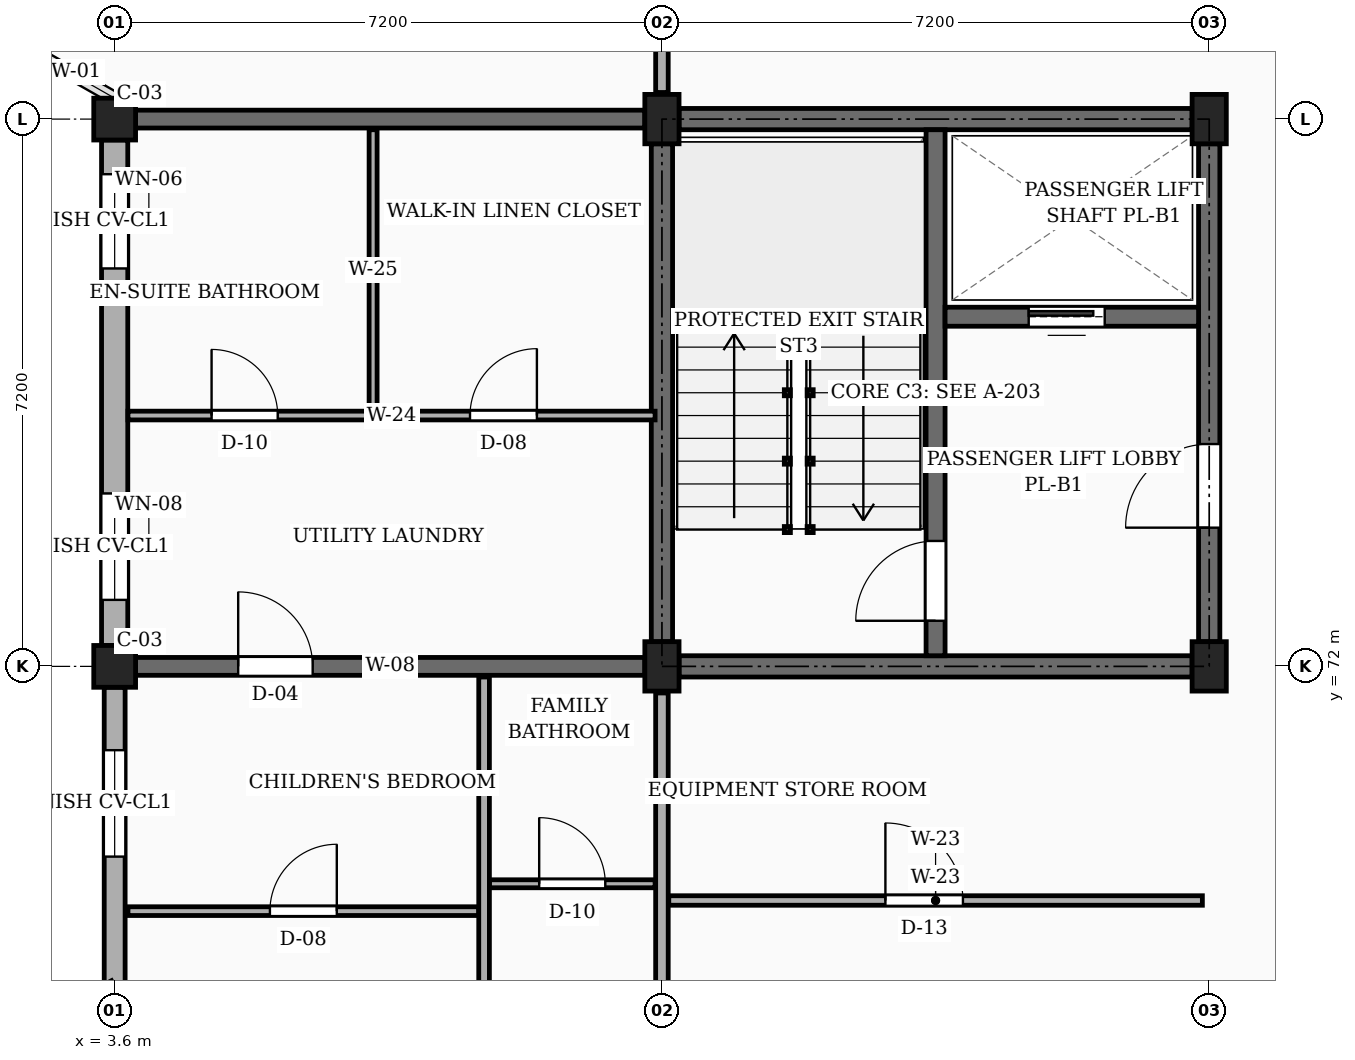
"""IFC4 building model, lengths in metres.
Left out: names, types, materials, properties, quantities, classifications, styles, units other than length and angle.
Written with IfcOpenShell. Run it as: python <this file> out.ifc"""

import sys

from ifc_helpers import new_model, si_unit, direction, frame, frame_2d, origin, origin_2d, place, context, subcontext, project, spatial, rectangle, extrude, element, fill, save


model = new_model("IFC4")
c1 = context("Model", 3, precision=1e-05, world=origin(), true_north=direction((0.0, 1.0)))
c2 = subcontext(c1, "Body", "Model", "MODEL_VIEW")
j1 = project(units=[si_unit("LENGTHUNIT", "METRE"), si_unit("PLANEANGLEUNIT", "RADIAN")], contexts=[c1])
p1 = place(None, origin())
s1 = spatial("IfcSite", under=j1, at=p1, CompositionType="ELEMENT")
p2 = place(p1, origin())
s2 = spatial("IfcBuilding", under=s1, at=p2, CompositionType="ELEMENT")
p3 = place(p2, frame((0.0, 0.0, 13.95)))
s3 = spatial("IfcBuildingStorey", under=s2, at=p3, CompositionType="ELEMENT", Elevation=13.95)
for number, where, z_axis, x_axis in (
    (1, (3.6, 72.0, 0.0), (0.0, 0.0, 1.0), (1.0, 0.0, 0.0)),
    (2, (3.6, 79.2, 0.0), (0.0, 0.0, 1.0), (1.0, 0.0, 0.0)),
):
    element("IfcColumn", number, at=place(p3, frame(where, z_axis=z_axis, x_axis=x_axis)), inside=s3, PredefinedType="COLUMN", context=c2, shape_type="SweptSolid", body=[
        extrude(rectangle(XDim=0.55, YDim=0.55, at=origin_2d()), origin(), (0.0, 0.0, 1.0), 3.15),
    ])
for number, where, z_axis, x_axis in (
    (3, (10.8, 72.0, 0.0), (0.0, 0.0, 1.0), (1.0, 0.0, 0.0)),
    (4, (10.8, 79.2, 0.0), (0.0, 0.0, 1.0), (1.0, 0.0, 0.0)),
    (5, (18.0, 72.0, 0.0), (0.0, 0.0, 1.0), (1.0, 0.0, 0.0)),
    (6, (18.0, 79.2, 0.0), (0.0, 0.0, 1.0), (1.0, 0.0, 0.0)),
):
    element("IfcColumn", number, at=place(p3, frame(where, z_axis=z_axis, x_axis=x_axis)), inside=s3, PredefinedType="COLUMN", context=c2, shape_type="SweptSolid", body=[
        extrude(rectangle(XDim=0.45, YDim=0.65, at=origin_2d()), origin(), (0.0, 0.0, 1.0), 3.15),
    ])
p4 = place(p3, frame((3.875, 72.0, 0.0), z_axis=(0.0, 0.0, 1.0), x_axis=(1.0, 0.0, 0.0)))
e7 = element("IfcWall", 7, at=p4, inside=s3, PredefinedType="SOLIDWALL", context=c2, shape_type="SweptSolid", body=[
    extrude(rectangle(XDim=6.7, YDim=0.235, at=frame_2d((3.35, 0.0))), origin(), (0.0, 0.0, 1.0), 2.21),
])
p5 = place(p4, frame((1.35, 0.0, 0.0)))
e8 = element("IfcOpeningElement", 8, at=p5, cuts=e7, PredefinedType="OPENING", context=c2, shape_type="SweptSolid", body=[
    extrude(rectangle(XDim=0.98, YDim=2.12, at=frame_2d((0.49, 1.06))), frame((0.0, 0.127, 0.0), z_axis=(0.0, -1.0, 0.0), x_axis=(1.0, 0.0, 0.0)), (0.0, 0.0, 1.0), 0.255),
])
p6 = place(p3, frame((3.875, 79.2, 0.0), z_axis=(0.0, 0.0, 1.0), x_axis=(1.0, 0.0, 0.0)))
e9 = element("IfcWall", 9, at=p6, inside=s3, PredefinedType="SOLIDWALL", context=c2, shape_type="SweptSolid", body=[
    extrude(rectangle(XDim=6.7, YDim=0.235, at=frame_2d((3.35, 0.0))), origin(), (0.0, 0.0, 1.0), 2.21),
])
p7 = place(p3, frame((3.6, 78.925, 0.0), z_axis=(0.0, 0.0, 1.0), x_axis=(0.0, -1.0, 0.0)))
e10 = element("IfcWall", 10, at=p7, inside=s3, PredefinedType="SOLIDWALL", context=c2, shape_type="SweptSolid", body=[
    extrude(rectangle(XDim=6.65, YDim=0.345, at=frame_2d((3.325, 0.0))), origin(), (0.0, 0.0, 1.0), 2.48),
])
p8 = place(p7, frame((0.45, 0.0, 0.78)))
e11 = element("IfcOpeningElement", 11, at=p8, cuts=e10, PredefinedType="OPENING", context=c2, shape_type="SweptSolid", body=[
    extrude(rectangle(XDim=1.24, YDim=1.15, at=frame_2d((0.62, 0.575))), frame((0.0, 0.183, 0.0), z_axis=(0.0, -1.0, 0.0), x_axis=(1.0, 0.0, 0.0)), (0.0, 0.0, 1.0), 0.365),
])
p9 = place(p7, frame((4.65, 0.0, 0.78)))
e12 = element("IfcOpeningElement", 12, at=p9, cuts=e10, PredefinedType="OPENING", context=c2, shape_type="SweptSolid", body=[
    extrude(rectangle(XDim=1.4, YDim=1.15, at=frame_2d((0.7, 0.575))), frame((0.0, 0.183, 0.0), z_axis=(0.0, -1.0, 0.0), x_axis=(1.0, 0.0, 0.0)), (0.0, 0.0, 1.0), 0.365),
])
p10 = place(p3, frame((3.6, 71.725, 0.0), z_axis=(0.0, 0.0, 1.0), x_axis=(0.0, -1.0, 0.0)))
e13 = element("IfcWall", 13, at=p10, inside=s3, PredefinedType="SOLIDWALL", context=c2, shape_type="SweptSolid", body=[
    extrude(rectangle(XDim=3.905, YDim=0.275, at=frame_2d((1.953, 0.0))), origin(), (0.0, 0.0, 1.0), 2.48),
])
p11 = place(p10, frame((0.827, 0.0, 0.78)))
e14 = element("IfcOpeningElement", 14, at=p11, cuts=e13, PredefinedType="OPENING", context=c2, shape_type="SweptSolid", body=[
    extrude(rectangle(XDim=1.4, YDim=1.15, at=frame_2d((0.7, 0.575))), frame((0.0, 0.147, 0.0), z_axis=(0.0, -1.0, 0.0), x_axis=(1.0, 0.0, 0.0)), (0.0, 0.0, 1.0), 0.295),
])
p12 = place(p3, frame((10.8, 72.325, 0.0), z_axis=(0.0, 0.0, 1.0), x_axis=(0.0, 1.0, 0.0)))
e15 = element("IfcWall", 15, at=p12, inside=s3, PredefinedType="SHEAR", context=c2, shape_type="SweptSolid", body=[
    extrude(rectangle(XDim=6.55, YDim=0.28, at=frame_2d((3.275, 0.0))), origin(), (0.0, 0.0, 1.0), 2.91),
])
p13 = place(p3, frame((11.025, 79.2, 0.0), z_axis=(0.0, 0.0, 1.0), x_axis=(1.0, 0.0, 0.0)))
e16 = element("IfcWall", 16, at=p13, inside=s3, PredefinedType="SHEAR", context=c2, shape_type="SweptSolid", body=[
    extrude(rectangle(XDim=6.75, YDim=0.28, at=frame_2d((3.375, 0.0))), origin(), (0.0, 0.0, 1.0), 2.91),
])
p14 = place(p3, frame((18.0, 72.325, 0.0), z_axis=(0.0, 0.0, 1.0), x_axis=(0.0, 1.0, 0.0)))
e17 = element("IfcWall", 17, at=p14, inside=s3, PredefinedType="SHEAR", context=c2, shape_type="SweptSolid", body=[
    extrude(rectangle(XDim=6.55, YDim=0.28, at=frame_2d((3.275, 0.0))), origin(), (0.0, 0.0, 1.0), 2.91),
])
p15 = place(p14, frame((1.5, 0.0, 0.0)))
e18 = element("IfcOpeningElement", 18, at=p15, cuts=e17, PredefinedType="OPENING", context=c2, shape_type="SweptSolid", body=[
    extrude(rectangle(XDim=1.1, YDim=2.15, at=frame_2d((0.55, 1.075))), frame((0.0, 0.15, 0.0), z_axis=(0.0, -1.0, 0.0), x_axis=(1.0, 0.0, 0.0)), (0.0, 0.0, 1.0), 0.3),
])
p16 = place(p3, frame((11.025, 72.0, 0.0), z_axis=(0.0, 0.0, 1.0), x_axis=(1.0, 0.0, 0.0)))
e19 = element("IfcWall", 19, at=p16, inside=s3, PredefinedType="SHEAR", context=c2, shape_type="SweptSolid", body=[
    extrude(rectangle(XDim=6.75, YDim=0.28, at=frame_2d((3.375, 0.0))), origin(), (0.0, 0.0, 1.0), 2.91),
])
p17 = place(p3, frame((14.4, 72.14, 0.0), z_axis=(0.0, 0.0, 1.0), x_axis=(0.0, 1.0, 0.0)))
e20 = element("IfcWall", 20, at=p17, inside=s3, PredefinedType="SHEAR", context=c2, shape_type="SweptSolid", body=[
    extrude(rectangle(XDim=6.92, YDim=0.25, at=frame_2d((3.46, 0.0))), origin(), (0.0, 0.0, 1.0), 2.91),
])
p18 = place(p17, frame((0.46, 0.0, 0.0)))
e21 = element("IfcOpeningElement", 21, at=p18, cuts=e20, PredefinedType="OPENING", context=c2, shape_type="SweptSolid", body=[
    extrude(rectangle(XDim=1.05, YDim=2.15, at=frame_2d((0.525, 1.075))), frame((0.0, 0.135, 0.0), z_axis=(0.0, -1.0, 0.0), x_axis=(1.0, 0.0, 0.0)), (0.0, 0.0, 1.0), 0.27),
])
p19 = place(p3, frame((14.525, 76.6, 0.0), z_axis=(0.0, 0.0, 1.0), x_axis=(1.0, 0.0, 0.0)))
e22 = element("IfcWall", 22, at=p19, inside=s3, PredefinedType="SHEAR", context=c2, shape_type="SweptSolid", body=[
    extrude(rectangle(XDim=3.335, YDim=0.25, at=frame_2d((1.667, 0.0))), origin(), (0.0, 0.0, 1.0), 2.91),
])
p20 = place(p19, frame((1.1, 0.0, 0.0)))
e23 = element("IfcOpeningElement", 23, at=p20, cuts=e22, PredefinedType="OPENING", context=c2, shape_type="SweptSolid", body=[
    extrude(rectangle(XDim=1.0, YDim=2.2, at=frame_2d((0.5, 1.1))), frame((0.0, 0.135, 0.0), z_axis=(0.0, -1.0, 0.0), x_axis=(1.0, 0.0, 0.0)), (0.0, 0.0, 1.0), 0.27),
])
p21 = place(p3, frame((10.8, 65.15, 0.0), z_axis=(0.0, 0.0, 1.0), x_axis=(0.0, 1.0, 0.0)))
e24 = element("IfcWall", 24, at=p21, inside=s3, PredefinedType="PARTITIONING", context=c2, shape_type="SweptSolid", body=[
    extrude(rectangle(XDim=6.5, YDim=0.165, at=frame_2d((3.25, 0.0))), origin(), (0.0, 0.0, 1.0), 2.345),
])
p22 = place(p21, frame((1.0, 0.0, 0.0)))
e25 = element("IfcOpeningElement", 25, at=p22, cuts=e24, PredefinedType="OPENING", context=c2, shape_type="SweptSolid", body=[
    extrude(rectangle(XDim=0.94, YDim=2.12, at=frame_2d((0.47, 1.06))), frame((0.0, 0.093, 0.0), z_axis=(0.0, -1.0, 0.0), x_axis=(1.0, 0.0, 0.0)), (0.0, 0.0, 1.0), 0.185),
])
p23 = place(p3, frame((10.8, 79.55, 0.0), z_axis=(0.0, 0.0, 1.0), x_axis=(0.0, 1.0, 0.0)))
e26 = element("IfcWall", 26, at=p23, inside=s3, PredefinedType="PARTITIONING", context=c2, shape_type="SweptSolid", body=[
    extrude(rectangle(XDim=6.5, YDim=0.165, at=frame_2d((3.25, 0.0))), origin(), (0.0, 0.0, 1.0), 2.345),
])
p24 = place(p23, frame((1.1, 0.0, 0.0)))
e27 = element("IfcOpeningElement", 27, at=p24, cuts=e26, PredefinedType="OPENING", context=c2, shape_type="SweptSolid", body=[
    extrude(rectangle(XDim=1.14, YDim=2.18, at=frame_2d((0.57, 1.09))), frame((0.0, 0.093, 0.0), z_axis=(0.0, -1.0, 0.0), x_axis=(1.0, 0.0, 0.0)), (0.0, 0.0, 1.0), 0.185),
])
p25 = place(p3, frame((10.89, 68.92, 0.0), z_axis=(0.0, 0.0, 1.0), x_axis=(1.0, 0.0, 0.0)))
e28 = element("IfcWall", 28, at=p25, inside=s3, PredefinedType="PARTITIONING", context=c2, shape_type="SweptSolid", body=[
    extrude(rectangle(XDim=7.02, YDim=0.125, at=frame_2d((3.51, 0.0))), origin(), (0.0, 0.0, 1.0), 2.345),
])
p26 = place(p25, frame((2.85, 0.0, 0.0)))
e29 = element("IfcOpeningElement", 29, at=p26, cuts=e28, PredefinedType="OPENING", context=c2, shape_type="SweptSolid", body=[
    extrude(rectangle(XDim=1.02, YDim=2.15, at=frame_2d((0.51, 1.075))), frame((0.0, 0.073, 0.0), z_axis=(0.0, -1.0, 0.0), x_axis=(1.0, 0.0, 0.0)), (0.0, 0.0, 1.0), 0.145),
])
p27 = place(p3, frame((3.775, 68.78, 0.0), z_axis=(0.0, 0.0, 1.0), x_axis=(1.0, 0.0, 0.0)))
e30 = element("IfcWall", 30, at=p27, inside=s3, PredefinedType="PARTITIONING", context=c2, shape_type="SweptSolid", body=[
    extrude(rectangle(XDim=4.615, YDim=0.115, at=frame_2d((2.308, 0.0))), origin(), (0.0, 0.0, 1.0), 2.345),
])
p28 = place(p27, frame((1.867, 0.0, 0.0)))
e31 = element("IfcOpeningElement", 31, at=p28, cuts=e30, PredefinedType="OPENING", context=c2, shape_type="SweptSolid", body=[
    extrude(rectangle(XDim=0.88, YDim=2.08, at=frame_2d((0.44, 1.04))), frame((0.0, 0.067, 0.0), z_axis=(0.0, -1.0, 0.0), x_axis=(1.0, 0.0, 0.0)), (0.0, 0.0, 1.0), 0.135),
])
p29 = place(p3, frame((8.53, 69.14, 0.0), z_axis=(0.0, 0.0, 1.0), x_axis=(1.0, 0.0, 0.0)))
e32 = element("IfcWall", 32, at=p29, inside=s3, PredefinedType="PARTITIONING", context=c2, shape_type="SweptSolid", body=[
    extrude(rectangle(XDim=2.18, YDim=0.105, at=frame_2d((1.09, 0.0))), origin(), (0.0, 0.0, 1.0), 2.345),
])
p30 = place(p29, frame((0.655, 0.0, 0.0)))
e33 = element("IfcOpeningElement", 33, at=p30, cuts=e32, PredefinedType="OPENING", context=c2, shape_type="SweptSolid", body=[
    extrude(rectangle(XDim=0.87, YDim=2.05, at=frame_2d((0.435, 1.025))), frame((0.0, 0.062, 0.0), z_axis=(0.0, -1.0, 0.0), x_axis=(1.0, 0.0, 0.0)), (0.0, 0.0, 1.0), 0.125),
])
p31 = place(p3, frame((8.46, 64.975, 0.0), z_axis=(0.0, 0.0, 1.0), x_axis=(0.0, 1.0, 0.0)))
e34 = element("IfcWall", 34, at=p31, inside=s3, PredefinedType="PARTITIONING", context=c2, shape_type="SweptSolid", body=[
    extrude(rectangle(XDim=6.885, YDim=0.14, at=frame_2d((3.442, 0.0))), origin(), (0.0, 0.0, 1.0), 2.345),
])
p32 = place(p31, frame((1.275, 0.0, 0.0)))
e35 = element("IfcOpeningElement", 35, at=p32, cuts=e34, PredefinedType="OPENING", context=c2, shape_type="SweptSolid", body=[
    extrude(rectangle(XDim=0.92, YDim=2.1, at=frame_2d((0.46, 1.05))), frame((0.0, 0.08, 0.0), z_axis=(0.0, -1.0, 0.0), x_axis=(1.0, 0.0, 0.0)), (0.0, 0.0, 1.0), 0.16),
])
p33 = place(p3, frame((3.775, 75.3, 0.0), z_axis=(0.0, 0.0, 1.0), x_axis=(1.0, 0.0, 0.0)))
e36 = element("IfcWall", 36, at=p33, inside=s3, PredefinedType="PARTITIONING", context=c2, shape_type="SweptSolid", body=[
    extrude(rectangle(XDim=6.935, YDim=0.115, at=frame_2d((3.468, 0.0))), origin(), (0.0, 0.0, 1.0), 2.345),
])
p34 = place(p33, frame((1.1, 0.0, 0.0)))
e37 = element("IfcOpeningElement", 37, at=p34, cuts=e36, PredefinedType="OPENING", context=c2, shape_type="SweptSolid", body=[
    extrude(rectangle(XDim=0.87, YDim=2.05, at=frame_2d((0.435, 1.025))), frame((0.0, 0.067, 0.0), z_axis=(0.0, -1.0, 0.0), x_axis=(1.0, 0.0, 0.0)), (0.0, 0.0, 1.0), 0.135),
])
p35 = place(p33, frame((4.5, 0.0, 0.0)))
e38 = element("IfcOpeningElement", 38, at=p35, cuts=e36, PredefinedType="OPENING", context=c2, shape_type="SweptSolid", body=[
    extrude(rectangle(XDim=0.88, YDim=2.08, at=frame_2d((0.44, 1.04))), frame((0.0, 0.067, 0.0), z_axis=(0.0, -1.0, 0.0), x_axis=(1.0, 0.0, 0.0)), (0.0, 0.0, 1.0), 0.135),
])
p36 = place(p3, frame((7.0, 75.37, 0.0), z_axis=(0.0, 0.0, 1.0), x_axis=(0.0, 1.0, 0.0)))
e39 = element("IfcWall", 39, at=p36, inside=s3, PredefinedType="PARTITIONING", context=c2, shape_type="SweptSolid", body=[
    extrude(rectangle(XDim=3.69, YDim=0.105, at=frame_2d((1.845, 0.0))), origin(), (0.0, 0.0, 1.0), 2.345),
])
p37 = place(p8, origin())
e40 = element("IfcWindow", 40, at=p37, inside=s3, PartitioningType="SINGLE_PANEL", PredefinedType="WINDOW", context=c2, shape_type="SweptSolid", body=[
    extrude(rectangle(XDim=1.24, YDim=1.15, at=frame_2d((0.62, 0.575))), frame((0.0, 0.03, 0.0), z_axis=(0.0, -1.0, 0.0), x_axis=(1.0, 0.0, 0.0)), (0.0, 0.0, 1.0), 0.06),
])
fill(e11, e40)
p38 = place(p9, origin())
e41 = element("IfcWindow", 41, at=p38, inside=s3, PartitioningType="SINGLE_PANEL", PredefinedType="WINDOW", context=c2, shape_type="SweptSolid", body=[
    extrude(rectangle(XDim=1.4, YDim=1.15, at=frame_2d((0.7, 0.575))), frame((0.0, 0.03, 0.0), z_axis=(0.0, -1.0, 0.0), x_axis=(1.0, 0.0, 0.0)), (0.0, 0.0, 1.0), 0.06),
])
fill(e12, e41)
p39 = place(p11, origin())
e42 = element("IfcWindow", 42, at=p39, inside=s3, PartitioningType="SINGLE_PANEL", PredefinedType="WINDOW", context=c2, shape_type="SweptSolid", body=[
    extrude(rectangle(XDim=1.4, YDim=1.15, at=frame_2d((0.7, 0.575))), frame((0.0, 0.03, 0.0), z_axis=(0.0, -1.0, 0.0), x_axis=(1.0, 0.0, 0.0)), (0.0, 0.0, 1.0), 0.06),
])
fill(e14, e42)
p40 = place(p15, frame((1.1, 0.0, 0.0), z_axis=(0.0, 0.0, 1.0), x_axis=(-1.0, 0.0, 0.0)))
e43 = element("IfcDoor", 43, at=p40, inside=s3, OperationType="SINGLE_SWING_LEFT", PredefinedType="DOOR", context=c2, shape_type="SweptSolid", body=[
    extrude(rectangle(XDim=1.1, YDim=2.15, at=frame_2d((0.55, 1.075))), frame((0.0, 0.025, 0.0), z_axis=(0.0, -1.0, 0.0), x_axis=(1.0, 0.0, 0.0)), (0.0, 0.0, 1.0), 0.05),
])
fill(e18, e43)
p41 = place(p18, origin())
e44 = element("IfcDoor", 44, at=p41, inside=s3, OperationType="SINGLE_SWING_LEFT", PredefinedType="DOOR", context=c2, shape_type="SweptSolid", body=[
    extrude(rectangle(XDim=1.05, YDim=2.15, at=frame_2d((0.525, 1.075))), frame((0.0, 0.025, 0.0), z_axis=(0.0, -1.0, 0.0), x_axis=(1.0, 0.0, 0.0)), (0.0, 0.0, 1.0), 0.05),
])
fill(e21, e44)
p42 = place(p20, origin())
e45 = element("IfcDoor", 45, at=p42, inside=s3, OperationType="SLIDING_TO_LEFT", PredefinedType="DOOR", context=c2, shape_type="SweptSolid", body=[
    extrude(rectangle(XDim=1.0, YDim=2.2, at=frame_2d((0.5, 1.1))), frame((0.0, 0.025, 0.0), z_axis=(0.0, -1.0, 0.0), x_axis=(1.0, 0.0, 0.0)), (0.0, 0.0, 1.0), 0.05),
])
fill(e23, e45)
p43 = place(p26, origin())
e46 = element("IfcDoor", 46, at=p43, inside=s3, OperationType="SINGLE_SWING_LEFT", PredefinedType="DOOR", context=c2, shape_type="SweptSolid", body=[
    extrude(rectangle(XDim=1.02, YDim=2.15, at=frame_2d((0.51, 1.075))), frame((0.0, 0.025, 0.0), z_axis=(0.0, -1.0, 0.0), x_axis=(1.0, 0.0, 0.0)), (0.0, 0.0, 1.0), 0.05),
])
fill(e29, e46)
p44 = place(p28, origin())
e47 = element("IfcDoor", 47, at=p44, inside=s3, OperationType="SINGLE_SWING_RIGHT", PredefinedType="DOOR", context=c2, shape_type="SweptSolid", body=[
    extrude(rectangle(XDim=0.88, YDim=2.08, at=frame_2d((0.44, 1.04))), frame((0.0, 0.025, 0.0), z_axis=(0.0, -1.0, 0.0), x_axis=(1.0, 0.0, 0.0)), (0.0, 0.0, 1.0), 0.05),
])
fill(e31, e47)
p45 = place(p30, origin())
e48 = element("IfcDoor", 48, at=p45, inside=s3, OperationType="SINGLE_SWING_LEFT", PredefinedType="DOOR", context=c2, shape_type="SweptSolid", body=[
    extrude(rectangle(XDim=0.87, YDim=2.05, at=frame_2d((0.435, 1.025))), frame((0.0, 0.025, 0.0), z_axis=(0.0, -1.0, 0.0), x_axis=(1.0, 0.0, 0.0)), (0.0, 0.0, 1.0), 0.05),
])
fill(e33, e48)
p46 = place(p34, origin())
e49 = element("IfcDoor", 49, at=p46, inside=s3, OperationType="SINGLE_SWING_LEFT", PredefinedType="DOOR", context=c2, shape_type="SweptSolid", body=[
    extrude(rectangle(XDim=0.87, YDim=2.05, at=frame_2d((0.435, 1.025))), frame((0.0, 0.025, 0.0), z_axis=(0.0, -1.0, 0.0), x_axis=(1.0, 0.0, 0.0)), (0.0, 0.0, 1.0), 0.05),
])
fill(e37, e49)
p47 = place(p35, origin())
e50 = element("IfcDoor", 50, at=p47, inside=s3, OperationType="SINGLE_SWING_RIGHT", PredefinedType="DOOR", context=c2, shape_type="SweptSolid", body=[
    extrude(rectangle(XDim=0.88, YDim=2.08, at=frame_2d((0.44, 1.04))), frame((0.0, 0.025, 0.0), z_axis=(0.0, -1.0, 0.0), x_axis=(1.0, 0.0, 0.0)), (0.0, 0.0, 1.0), 0.05),
])
fill(e38, e50)
p48 = place(p5, origin())
e51 = element("IfcDoor", 51, at=p48, inside=s3, OperationType="SINGLE_SWING_LEFT", PredefinedType="DOOR", context=c2, shape_type="SweptSolid", body=[
    extrude(rectangle(XDim=0.98, YDim=2.12, at=frame_2d((0.49, 1.06))), frame((0.0, 0.025, 0.0), z_axis=(0.0, -1.0, 0.0), x_axis=(1.0, 0.0, 0.0)), (0.0, 0.0, 1.0), 0.05),
])
fill(e8, e51)
save(model, sys.argv[1])
